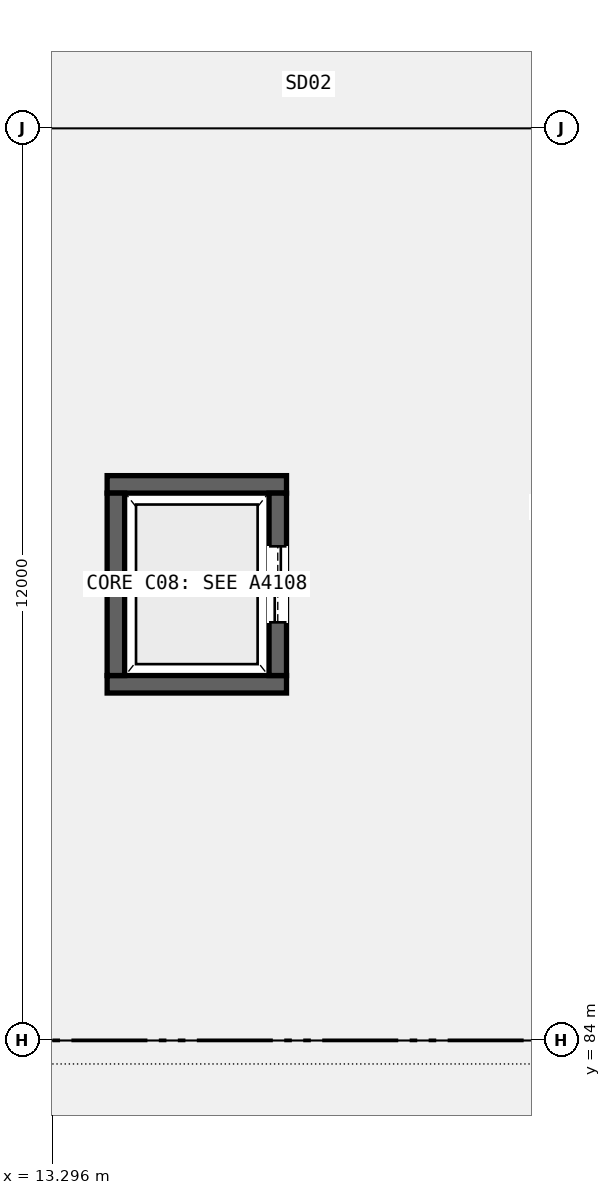
"""IFC4 building model, lengths in metres.
Left out: names, types, materials, properties, quantities, classifications, styles, units other than length and angle.
Written with IfcOpenShell. Run it as: python <this file> out.ifc"""

import sys

from ifc_helpers import new_model, si_unit, direction, frame, frame_2d, origin, place, context, subcontext, project, spatial, rectangle, extrude, element, fill, save


model = new_model("IFC4")
c1 = context("Model", 3, precision=1e-05, world=origin(), true_north=direction((0.0, 1.0)))
c2 = subcontext(c1, "Body", "Model", "MODEL_VIEW")
j1 = project(units=[si_unit("LENGTHUNIT", "METRE"), si_unit("PLANEANGLEUNIT", "RADIAN")], contexts=[c1])
p1 = place(None, origin())
s1 = spatial("IfcSite", under=j1, at=p1, CompositionType="ELEMENT")
p2 = place(p1, origin())
s2 = spatial("IfcBuilding", under=s1, at=p2, CompositionType="ELEMENT")
p3 = place(p2, frame((0.0, 0.0, 10.2)))
s3 = spatial("IfcBuildingStorey", under=s2, at=p3, CompositionType="ELEMENT", Elevation=10.2)
for number, where, z_axis, x_axis in (
    (1, (14.02, 88.685, 0.0), (0.0, 0.0, 1.0), (1.0, 0.0, 0.0)),
    (2, (14.02, 91.315, 0.0), (0.0, 0.0, 1.0), (1.0, 0.0, 0.0)),
):
    element("IfcWall", number, at=place(p3, frame(where, z_axis=z_axis, x_axis=x_axis)), inside=s3, PredefinedType="SHEAR", context=c2, shape_type="SweptSolid", body=[
        extrude(rectangle(XDim=2.36, YDim=0.23, at=frame_2d((1.18, 0.0))), origin(), (0.0, 0.0, 1.0), 4.82),
    ])
p4 = place(p3, frame((14.135, 88.8, 0.0), z_axis=(0.0, 0.0, 1.0), x_axis=(0.0, 1.0, 0.0)))
e3 = element("IfcWall", 3, at=p4, inside=s3, PredefinedType="SHEAR", context=c2, shape_type="SweptSolid", body=[
    extrude(rectangle(XDim=2.4, YDim=0.23, at=frame_2d((1.2, 0.0))), origin(), (0.0, 0.0, 1.0), 4.82),
])
p5 = place(p3, frame((16.265, 88.8, 0.0), z_axis=(0.0, 0.0, 1.0), x_axis=(0.0, 1.0, 0.0)))
e4 = element("IfcWall", 4, at=p5, inside=s3, PredefinedType="SHEAR", context=c2, shape_type="SweptSolid", body=[
    extrude(rectangle(XDim=2.4, YDim=0.23, at=frame_2d((1.2, 0.0))), origin(), (0.0, 0.0, 1.0), 4.82),
])
p6 = place(p5, frame((0.7, 0.0, 0.0)))
e5 = element("IfcOpeningElement", 5, at=p6, cuts=e4, PredefinedType="OPENING", context=c2, shape_type="SweptSolid", body=[
    extrude(rectangle(XDim=1.0, YDim=2.15, at=frame_2d((0.5, 1.075))), frame((0.0, 0.125, 0.0), z_axis=(0.0, -1.0, 0.0), x_axis=(1.0, 0.0, 0.0)), (0.0, 0.0, 1.0), 0.25),
])
p7 = place(p6, origin())
e6 = element("IfcDoor", 6, at=p7, inside=s3, OperationType="DOUBLE_DOOR_SLIDING", PredefinedType="DOOR", context=c2, shape_type="SweptSolid", body=[
    extrude(rectangle(XDim=1.0, YDim=2.15, at=frame_2d((0.5, 1.075))), frame((0.0, 0.025, 0.0), z_axis=(0.0, -1.0, 0.0), x_axis=(1.0, 0.0, 0.0)), (0.0, 0.0, 1.0), 0.05),
])
fill(e5, e6)
save(model, sys.argv[1])
